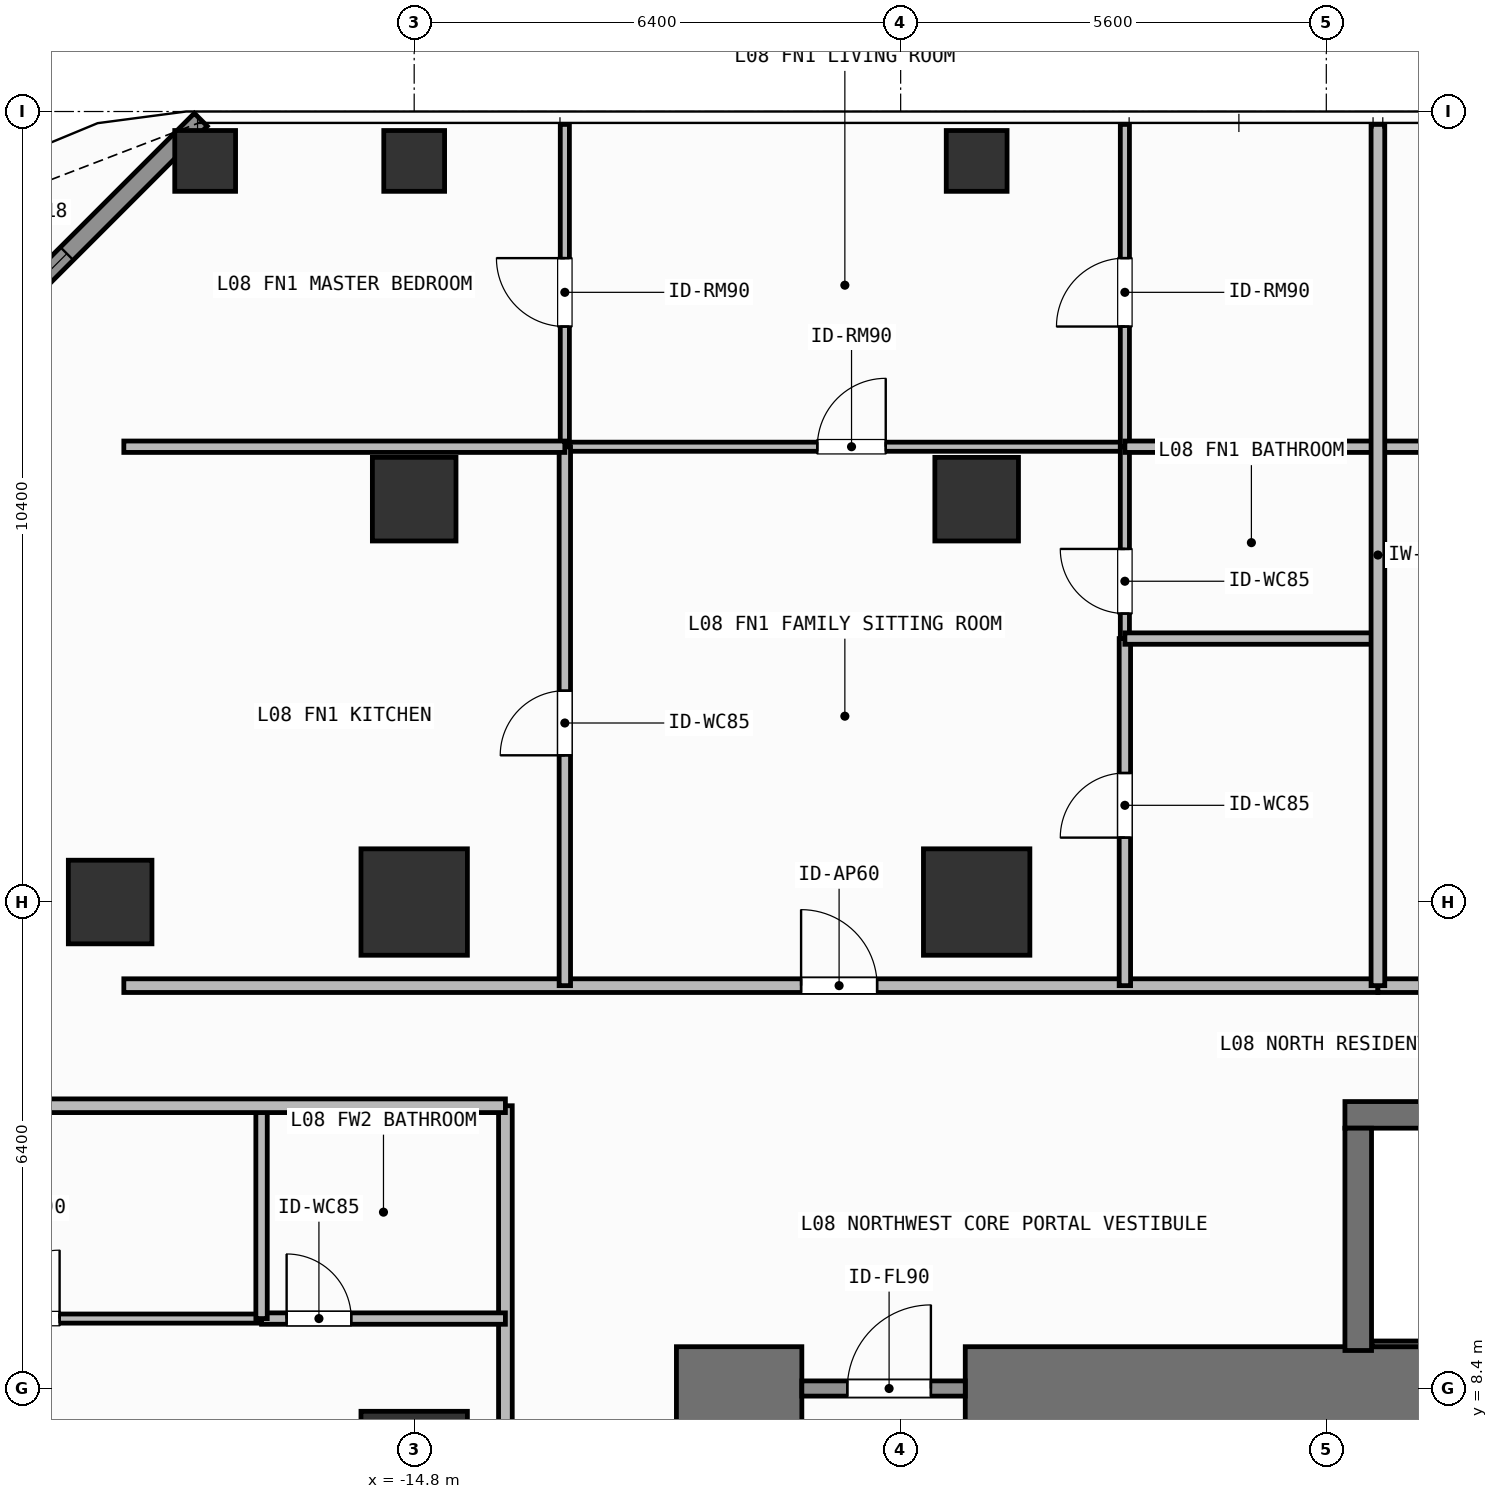
"""IFC4 building model, lengths in metres.
Left out: names, types, materials, properties, quantities, classifications, styles, units other than length and angle.
Written with IfcOpenShell. Run it as: python <this file> out.ifc"""

import sys

from ifc_helpers import new_model, si_unit, direction, frame, frame_2d, origin, origin_2d, place, context, subcontext, project, spatial, rectangle, hollow_rectangle, extrude, element, fill, save


model = new_model("IFC4")
c1 = context("Model", 3, precision=1e-05, world=origin(), true_north=direction((0.0, 1.0)))
c2 = subcontext(c1, "Body", "Model", "MODEL_VIEW")
j1 = project(units=[si_unit("LENGTHUNIT", "METRE"), si_unit("PLANEANGLEUNIT", "RADIAN")], contexts=[c1])
p1 = place(None, origin())
s1 = spatial("IfcSite", under=j1, at=p1, CompositionType="ELEMENT")
p2 = place(p1, origin())
s2 = spatial("IfcBuilding", under=s1, at=p2, CompositionType="ELEMENT")
p3 = place(p2, frame((0.0, 0.0, 30.6)))
s3 = spatial("IfcBuildingStorey", under=s2, at=p3, CompositionType="ELEMENT", Elevation=30.6)
p4 = place(p3, frame((-11.35, 8.4, 0.0), z_axis=(0.0, 0.0, 1.0), x_axis=(1.0, 0.0, 0.0)))
e1 = element("IfcWall", 1, at=p4, inside=s3, PredefinedType="SHEAR", context=c2, shape_type="SweptSolid", body=[
    extrude(rectangle(XDim=1.65, YDim=1.1, at=frame_2d((0.825, 0.0))), origin(), (0.0, 0.0, 1.0), 3.9),
])
p5 = place(p3, frame((-7.55, 8.4, 0.0), z_axis=(0.0, 0.0, 1.0), x_axis=(1.0, 0.0, 0.0)))
e2 = element("IfcWall", 2, at=p5, inside=s3, PredefinedType="SHEAR", context=c2, shape_type="SweptSolid", body=[
    extrude(rectangle(XDim=16.5, YDim=1.1, at=frame_2d((8.25, 0.0))), origin(), (0.0, 0.0, 1.0), 3.9),
])
p6 = place(p3, frame((-2.555, 12.0, 0.0), z_axis=(0.0, 0.0, 1.0), x_axis=(1.0, 0.0, 0.0)))
e3 = element("IfcWall", 3, at=p6, inside=s3, PredefinedType="SHEAR", context=c2, shape_type="SweptSolid", body=[
    extrude(rectangle(XDim=7.31, YDim=0.35, at=frame_2d((3.655, 0.0))), origin(), (0.0, 0.0, 1.0), 3.9),
])
p7 = place(p3, frame((-2.2, 8.988, 0.0), z_axis=(0.0, 0.0, 1.0), x_axis=(1.0, 0.0, 0.0)))
e4 = element("IfcWall", 4, at=p7, inside=s3, PredefinedType="SHEAR", context=c2, shape_type="SweptSolid", body=[
    extrude(rectangle(XDim=6.6, YDim=0.075, at=frame_2d((3.3, 0.0))), origin(), (0.0, 0.0, 1.0), 3.9),
])
p8 = place(p3, frame((-2.38, 8.9, 0.0), z_axis=(0.0, 0.0, 1.0), x_axis=(0.0, 1.0, 0.0)))
e5 = element("IfcWall", 5, at=p8, inside=s3, PredefinedType="SHEAR", context=c2, shape_type="SweptSolid", body=[
    extrude(rectangle(XDim=2.925, YDim=0.35, at=frame_2d((1.462, 0.0))), origin(), (0.0, 0.0, 1.0), 3.9),
])
for number, where, z_axis, x_axis in (
    (6, (-14.8, 14.8, 0.0), (0.0, 0.0, 1.0), (1.0, 0.0, 0.0)),
    (7, (-7.4, 14.8, 0.0), (0.0, 0.0, 1.0), (1.0, 0.0, 0.0)),
    (8, (-14.8, 7.4, 0.0), (0.0, 0.0, 1.0), (1.0, 0.0, 0.0)),
):
    element("IfcColumn", number, at=place(p3, frame(where, z_axis=z_axis, x_axis=x_axis)), inside=s3, PredefinedType="COLUMN", context=c2, shape_type="SweptSolid", body=[
        extrude(rectangle(XDim=1.4, YDim=1.4, at=origin_2d()), origin(), (0.0, 0.0, 1.0), 3.9),
    ])
for number, where, z_axis, x_axis in (
    (9, (-18.8, 14.8, 0.0), (0.0, 0.0, 1.0), (1.0, 0.0, 0.0)),
    (10, (-14.8, 20.1, 0.0), (0.0, 0.0, 1.0), (1.0, 0.0, 0.0)),
    (11, (-7.4, 20.1, 0.0), (0.0, 0.0, 1.0), (1.0, 0.0, 0.0)),
):
    element("IfcColumn", number, at=place(p3, frame(where, z_axis=z_axis, x_axis=x_axis)), inside=s3, PredefinedType="COLUMN", context=c2, shape_type="SweptSolid", body=[
        extrude(rectangle(XDim=1.1, YDim=1.1, at=origin_2d()), origin(), (0.0, 0.0, 1.0), 3.9),
    ])
for number, where, z_axis, x_axis in (
    (12, (-17.55, 24.55, 0.0), (0.0, 0.0, 1.0), (1.0, 0.0, 0.0)),
    (13, (-14.8, 24.55, 0.0), (0.0, 0.0, 1.0), (1.0, 0.0, 0.0)),
    (14, (-7.4, 24.55, 0.0), (0.0, 0.0, 1.0), (1.0, 0.0, 0.0)),
):
    element("IfcColumn", number, at=place(p3, frame(where, z_axis=z_axis, x_axis=x_axis)), inside=s3, PredefinedType="COLUMN", context=c2, shape_type="SweptSolid", body=[
        extrude(hollow_rectangle(XDim=0.8, YDim=0.8, WallThickness=0.036, at=origin_2d()), origin(), (0.0, 0.0, 1.0), 3.9),
    ])
p9 = place(p3, frame((-22.192, 20.508, 0.0), z_axis=(0.0, 0.0, 1.0), x_axis=(0.707106781187, 0.707106781187, 0.0)))
e15 = element("IfcWall", 15, at=p9, inside=s3, PredefinedType="SOLIDWALL", context=c2, shape_type="SweptSolid", body=[
    extrude(rectangle(XDim=6.484, YDim=0.24, at=frame_2d((3.242, 0.0))), origin(), (0.0, 0.0, 1.0), 3.68),
])
p10 = place(p9, frame((2.492, 0.0, 0.8)))
e16 = element("IfcOpeningElement", 16, at=p10, cuts=e15, PredefinedType="OPENING", context=c2, shape_type="SweptSolid", body=[
    extrude(rectangle(XDim=1.5, YDim=1.85, at=frame_2d((0.75, 0.925))), frame((0.0, 0.13, 0.0), z_axis=(0.0, -1.0, 0.0), x_axis=(1.0, 0.0, 0.0)), (0.0, 0.0, 1.0), 0.26),
])
p11 = place(p3, frame((-9.7, 8.4, 0.0), z_axis=(0.0, 0.0, 1.0), x_axis=(1.0, 0.0, 0.0)))
e17 = element("IfcWall", 17, at=p11, inside=s3, PredefinedType="SOLIDWALL", context=c2, shape_type="SweptSolid", body=[
    extrude(rectangle(XDim=2.15, YDim=0.2, at=frame_2d((1.075, 0.0))), origin(), (0.0, 0.0, 1.0), 2.72),
])
p12 = place(p11, frame((0.598, 0.0, 0.0)))
e18 = element("IfcOpeningElement", 18, at=p12, cuts=e17, PredefinedType="OPENING", context=c2, shape_type="SweptSolid", body=[
    extrude(rectangle(XDim=1.1, YDim=2.15, at=frame_2d((0.55, 1.075))), frame((0.0, 0.11, 0.0), z_axis=(0.0, -1.0, 0.0), x_axis=(1.0, 0.0, 0.0)), (0.0, 0.0, 1.0), 0.22),
])
p13 = place(p3, frame((-18.62, 13.7, 0.0), z_axis=(0.0, 0.0, 1.0), x_axis=(1.0, 0.0, 0.0)))
e19 = element("IfcWall", 19, at=p13, inside=s3, PredefinedType="PARTITIONING", context=c2, shape_type="SweptSolid", body=[
    extrude(rectangle(XDim=16.499, YDim=0.18, at=frame_2d((8.25, 0.0))), origin(), (0.0, 0.0, 1.0), 3.68),
])
p14 = place(p13, frame((8.91, 0.0, 0.0)))
e20 = element("IfcOpeningElement", 20, at=p14, cuts=e19, PredefinedType="OPENING", context=c2, shape_type="SweptSolid", body=[
    extrude(rectangle(XDim=1.0, YDim=2.2, at=frame_2d((0.5, 1.1))), frame((0.0, 0.1, 0.0), z_axis=(0.0, -1.0, 0.0), x_axis=(1.0, 0.0, 0.0)), (0.0, 0.0, 1.0), 0.2),
])
p15 = place(p3, frame((-12.818, 20.79, 0.0), z_axis=(0.0, 0.0, 1.0), x_axis=(1.0, 0.0, 0.0)))
e21 = element("IfcWall", 21, at=p15, inside=s3, PredefinedType="PARTITIONING", context=c2, shape_type="SweptSolid", body=[
    extrude(rectangle(XDim=7.368, YDim=0.12, at=frame_2d((3.684, 0.0))), origin(), (0.0, 0.0, 1.0), 3.68),
])
p16 = place(p15, frame((3.322, 0.0, 0.0)))
e22 = element("IfcOpeningElement", 22, at=p16, cuts=e21, PredefinedType="OPENING", context=c2, shape_type="SweptSolid", body=[
    extrude(rectangle(XDim=0.9, YDim=2.1, at=frame_2d((0.45, 1.05))), frame((0.0, 0.07, 0.0), z_axis=(0.0, -1.0, 0.0), x_axis=(1.0, 0.0, 0.0)), (0.0, 0.0, 1.0), 0.14),
])
p17 = place(p3, frame((-12.818, 13.7, 0.0), z_axis=(0.0, 0.0, 1.0), x_axis=(0.0, 1.0, 0.0)))
e23 = element("IfcWall", 23, at=p17, inside=s3, PredefinedType="PARTITIONING", context=c2, shape_type="SweptSolid", body=[
    extrude(rectangle(XDim=7.09, YDim=0.15, at=frame_2d((3.545, 0.0))), origin(), (0.0, 0.0, 1.0), 3.68),
])
p18 = place(p17, frame((3.03, 0.0, 0.0)))
e24 = element("IfcOpeningElement", 24, at=p18, cuts=e23, PredefinedType="OPENING", context=c2, shape_type="SweptSolid", body=[
    extrude(rectangle(XDim=0.85, YDim=2.1, at=frame_2d((0.425, 1.05))), frame((0.0, 0.085, 0.0), z_axis=(0.0, -1.0, 0.0), x_axis=(1.0, 0.0, 0.0)), (0.0, 0.0, 1.0), 0.17),
])
p19 = place(p3, frame((-12.818, 20.79, 0.0), z_axis=(0.0, 0.0, 1.0), x_axis=(0.0, 1.0, 0.0)))
e25 = element("IfcWall", 25, at=p19, inside=s3, PredefinedType="PARTITIONING", context=c2, shape_type="SweptSolid", body=[
    extrude(rectangle(XDim=4.24, YDim=0.12, at=frame_2d((2.12, 0.0))), origin(), (0.0, 0.0, 1.0), 3.68),
])
p20 = place(p19, frame((1.581, 0.0, 0.0)))
e26 = element("IfcOpeningElement", 26, at=p20, cuts=e25, PredefinedType="OPENING", context=c2, shape_type="SweptSolid", body=[
    extrude(rectangle(XDim=0.9, YDim=2.1, at=frame_2d((0.45, 1.05))), frame((0.0, 0.07, 0.0), z_axis=(0.0, -1.0, 0.0), x_axis=(1.0, 0.0, 0.0)), (0.0, 0.0, 1.0), 0.14),
])
p21 = place(p3, frame((-5.45, 13.7, 0.0), z_axis=(0.0, 0.0, 1.0), x_axis=(0.0, 1.0, 0.0)))
e27 = element("IfcWall", 27, at=p21, inside=s3, PredefinedType="PARTITIONING", context=c2, shape_type="SweptSolid", body=[
    extrude(rectangle(XDim=4.566, YDim=0.15, at=frame_2d((2.283, 0.0))), origin(), (0.0, 0.0, 1.0), 3.68),
])
p22 = place(p21, frame((1.948, 0.0, 0.0)))
e28 = element("IfcOpeningElement", 28, at=p22, cuts=e27, PredefinedType="OPENING", context=c2, shape_type="SweptSolid", body=[
    extrude(rectangle(XDim=0.85, YDim=2.1, at=frame_2d((0.425, 1.05))), frame((0.0, 0.085, 0.0), z_axis=(0.0, -1.0, 0.0), x_axis=(1.0, 0.0, 0.0)), (0.0, 0.0, 1.0), 0.17),
])
p23 = place(p3, frame((-5.45, 18.266, 0.0), z_axis=(0.0, 0.0, 1.0), x_axis=(0.0, 1.0, 0.0)))
e29 = element("IfcWall", 29, at=p23, inside=s3, PredefinedType="PARTITIONING", context=c2, shape_type="SweptSolid", body=[
    extrude(rectangle(XDim=2.524, YDim=0.12, at=frame_2d((1.262, 0.0))), origin(), (0.0, 0.0, 1.0), 3.68),
])
p24 = place(p23, frame((0.329, 0.0, 0.0)))
e30 = element("IfcOpeningElement", 30, at=p24, cuts=e29, PredefinedType="OPENING", context=c2, shape_type="SweptSolid", body=[
    extrude(rectangle(XDim=0.85, YDim=2.1, at=frame_2d((0.425, 1.05))), frame((0.0, 0.07, 0.0), z_axis=(0.0, -1.0, 0.0), x_axis=(1.0, 0.0, 0.0)), (0.0, 0.0, 1.0), 0.14),
])
p25 = place(p3, frame((-5.45, 20.79, 0.0), z_axis=(0.0, 0.0, 1.0), x_axis=(0.0, 1.0, 0.0)))
e31 = element("IfcWall", 31, at=p25, inside=s3, PredefinedType="PARTITIONING", context=c2, shape_type="SweptSolid", body=[
    extrude(rectangle(XDim=4.24, YDim=0.12, at=frame_2d((2.12, 0.0))), origin(), (0.0, 0.0, 1.0), 3.68),
])
p26 = place(p25, frame((1.581, 0.0, 0.0)))
e32 = element("IfcOpeningElement", 32, at=p26, cuts=e31, PredefinedType="OPENING", context=c2, shape_type="SweptSolid", body=[
    extrude(rectangle(XDim=0.9, YDim=2.1, at=frame_2d((0.45, 1.05))), frame((0.0, 0.07, 0.0), z_axis=(0.0, -1.0, 0.0), x_axis=(1.0, 0.0, 0.0)), (0.0, 0.0, 1.0), 0.14),
])
p27 = place(p3, frame((-2.121, 13.7, 0.0), z_axis=(0.0, 0.0, 1.0), x_axis=(1.0, 0.0, 0.0)))
e33 = element("IfcWall", 33, at=p27, inside=s3, PredefinedType="PARTITIONING", context=c2, shape_type="SweptSolid", body=[
    extrude(rectangle(XDim=11.226, YDim=0.18, at=frame_2d((5.613, 0.0))), origin(), (0.0, 0.0, 1.0), 3.68),
])
p28 = place(p27, frame((5.29, 0.0, 0.0)))
e34 = element("IfcOpeningElement", 34, at=p28, cuts=e33, PredefinedType="OPENING", context=c2, shape_type="SweptSolid", body=[
    extrude(rectangle(XDim=1.0, YDim=2.2, at=frame_2d((0.5, 1.1))), frame((0.0, 0.1, 0.0), z_axis=(0.0, -1.0, 0.0), x_axis=(1.0, 0.0, 0.0)), (0.0, 0.0, 1.0), 0.2),
])
p29 = place(p3, frame((-13.6, 0.727, 0.0), z_axis=(0.0, 0.0, 1.0), x_axis=(0.0, 1.0, 0.0)))
e35 = element("IfcWall", 35, at=p29, inside=s3, PredefinedType="PARTITIONING", context=c2, shape_type="SweptSolid", body=[
    extrude(rectangle(XDim=11.393, YDim=0.18, at=frame_2d((5.697, 0.0))), origin(), (0.0, 0.0, 1.0), 3.68),
])
p30 = place(p29, frame((4.837, 0.0, 0.0)))
e36 = element("IfcOpeningElement", 36, at=p30, cuts=e35, PredefinedType="OPENING", context=c2, shape_type="SweptSolid", body=[
    extrude(rectangle(XDim=1.0, YDim=2.2, at=frame_2d((0.5, 1.1))), frame((0.0, 0.1, 0.0), z_axis=(0.0, -1.0, 0.0), x_axis=(1.0, 0.0, 0.0)), (0.0, 0.0, 1.0), 0.2),
])
p31 = place(p3, frame((-16.808, 9.32, 0.0), z_axis=(0.0, 0.0, 1.0), x_axis=(1.0, 0.0, 0.0)))
e37 = element("IfcWall", 37, at=p31, inside=s3, PredefinedType="PARTITIONING", context=c2, shape_type="SweptSolid", body=[
    extrude(rectangle(XDim=3.208, YDim=0.15, at=frame_2d((1.604, 0.0))), origin(), (0.0, 0.0, 1.0), 3.68),
])
p32 = place(p31, frame((0.33, 0.0, 0.0)))
e38 = element("IfcOpeningElement", 38, at=p32, cuts=e37, PredefinedType="OPENING", context=c2, shape_type="SweptSolid", body=[
    extrude(rectangle(XDim=0.85, YDim=2.1, at=frame_2d((0.425, 1.05))), frame((0.0, 0.085, 0.0), z_axis=(0.0, -1.0, 0.0), x_axis=(1.0, 0.0, 0.0)), (0.0, 0.0, 1.0), 0.17),
])
p33 = place(p3, frame((-22.13, 9.32, 0.0), z_axis=(0.0, 0.0, 1.0), x_axis=(1.0, 0.0, 0.0)))
e39 = element("IfcWall", 39, at=p33, inside=s3, PredefinedType="PARTITIONING", context=c2, shape_type="SweptSolid", body=[
    extrude(rectangle(XDim=5.322, YDim=0.12, at=frame_2d((2.661, 0.0))), origin(), (0.0, 0.0, 1.0), 3.68),
])
p34 = place(p33, frame((1.765, 0.0, 0.0)))
e40 = element("IfcOpeningElement", 40, at=p34, cuts=e39, PredefinedType="OPENING", context=c2, shape_type="SweptSolid", body=[
    extrude(rectangle(XDim=0.9, YDim=2.1, at=frame_2d((0.45, 1.05))), frame((0.0, 0.07, 0.0), z_axis=(0.0, -1.0, 0.0), x_axis=(1.0, 0.0, 0.0)), (0.0, 0.0, 1.0), 0.14),
])
p35 = place(p3, frame((-18.62, 20.79, 0.0), z_axis=(0.0, 0.0, 1.0), x_axis=(1.0, 0.0, 0.0)))
e41 = element("IfcWall", 41, at=p35, inside=s3, PredefinedType="PARTITIONING", context=c2, shape_type="SweptSolid", body=[
    extrude(rectangle(XDim=5.802, YDim=0.15, at=frame_2d((2.901, 0.0))), origin(), (0.0, 0.0, 1.0), 3.68),
])
for number, where, z_axis, x_axis in (
    (42, (-5.45, 18.266, 0.0), (0.0, 0.0, 1.0), (1.0, 0.0, 0.0)),
    (43, (-5.45, 20.79, 0.0), (0.0, 0.0, 1.0), (1.0, 0.0, 0.0)),
):
    element("IfcWall", number, at=place(p3, frame(where, z_axis=z_axis, x_axis=x_axis)), inside=s3, PredefinedType="PARTITIONING", context=c2, shape_type="SweptSolid", body=[
        extrude(rectangle(XDim=3.329, YDim=0.15, at=frame_2d((1.665, 0.0))), origin(), (0.0, 0.0, 1.0), 3.68),
    ])
p36 = place(p3, frame((-2.121, 20.79, 0.0), z_axis=(0.0, 0.0, 1.0), x_axis=(1.0, 0.0, 0.0)))
e44 = element("IfcWall", 44, at=p36, inside=s3, PredefinedType="PARTITIONING", context=c2, shape_type="SweptSolid", body=[
    extrude(rectangle(XDim=4.1, YDim=0.15, at=frame_2d((2.05, 0.0))), origin(), (0.0, 0.0, 1.0), 3.68),
])
p37 = place(p3, frame((-2.121, 13.7, 0.0), z_axis=(0.0, 0.0, 1.0), x_axis=(0.0, 1.0, 0.0)))
e45 = element("IfcWall", 45, at=p37, inside=s3, PredefinedType="PARTITIONING", context=c2, shape_type="SweptSolid", body=[
    extrude(rectangle(XDim=11.33, YDim=0.18, at=frame_2d((5.665, 0.0))), origin(), (0.0, 0.0, 1.0), 3.68),
])
p38 = place(p3, frame((-16.808, 9.32, 0.0), z_axis=(0.0, 0.0, 1.0), x_axis=(0.0, 1.0, 0.0)))
e46 = element("IfcWall", 46, at=p38, inside=s3, PredefinedType="PARTITIONING", context=c2, shape_type="SweptSolid", body=[
    extrude(rectangle(XDim=2.8, YDim=0.15, at=frame_2d((1.4, 0.0))), origin(), (0.0, 0.0, 1.0), 3.68),
])
p39 = place(p3, frame((-22.13, 12.12, 0.0), z_axis=(0.0, 0.0, 1.0), x_axis=(1.0, 0.0, 0.0)))
e47 = element("IfcWall", 47, at=p39, inside=s3, PredefinedType="PARTITIONING", context=c2, shape_type="SweptSolid", body=[
    extrude(rectangle(XDim=8.53, YDim=0.18, at=frame_2d((4.265, 0.0))), origin(), (0.0, 0.0, 1.0), 3.68),
])
p40 = place(p10, origin())
e48 = element("IfcWindow", 48, at=p40, inside=s3, PartitioningType="SINGLE_PANEL", PredefinedType="WINDOW", context=c2, shape_type="SweptSolid", body=[
    extrude(rectangle(XDim=1.5, YDim=1.85, at=frame_2d((0.75, 0.925))), frame((0.0, 0.03, 0.0), z_axis=(0.0, -1.0, 0.0), x_axis=(1.0, 0.0, 0.0)), (0.0, 0.0, 1.0), 0.06),
])
fill(e16, e48)
p41 = place(p12, origin())
e49 = element("IfcDoor", 49, at=p41, inside=s3, OperationType="SINGLE_SWING_RIGHT", PredefinedType="DOOR", context=c2, shape_type="SweptSolid", body=[
    extrude(rectangle(XDim=1.1, YDim=2.15, at=frame_2d((0.55, 1.075))), frame((0.0, 0.025, 0.0), z_axis=(0.0, -1.0, 0.0), x_axis=(1.0, 0.0, 0.0)), (0.0, 0.0, 1.0), 0.05),
])
fill(e18, e49)
p42 = place(p14, origin())
e50 = element("IfcDoor", 50, at=p42, inside=s3, OperationType="SINGLE_SWING_LEFT", PredefinedType="DOOR", context=c2, shape_type="SweptSolid", body=[
    extrude(rectangle(XDim=1.0, YDim=2.2, at=frame_2d((0.5, 1.1))), frame((0.0, 0.025, 0.0), z_axis=(0.0, -1.0, 0.0), x_axis=(1.0, 0.0, 0.0)), (0.0, 0.0, 1.0), 0.05),
])
fill(e20, e50)
p43 = place(p16, origin())
e51 = element("IfcDoor", 51, at=p43, inside=s3, OperationType="SINGLE_SWING_RIGHT", PredefinedType="DOOR", context=c2, shape_type="SweptSolid", body=[
    extrude(rectangle(XDim=0.9, YDim=2.1, at=frame_2d((0.45, 1.05))), frame((0.0, 0.025, 0.0), z_axis=(0.0, -1.0, 0.0), x_axis=(1.0, 0.0, 0.0)), (0.0, 0.0, 1.0), 0.05),
])
fill(e22, e51)
p44 = place(p18, origin())
e52 = element("IfcDoor", 52, at=p44, inside=s3, OperationType="SINGLE_SWING_LEFT", PredefinedType="DOOR", context=c2, shape_type="SweptSolid", body=[
    extrude(rectangle(XDim=0.85, YDim=2.1, at=frame_2d((0.425, 1.05))), frame((0.0, 0.025, 0.0), z_axis=(0.0, -1.0, 0.0), x_axis=(1.0, 0.0, 0.0)), (0.0, 0.0, 1.0), 0.05),
])
fill(e24, e52)
p45 = place(p20, origin())
e53 = element("IfcDoor", 53, at=p45, inside=s3, OperationType="SINGLE_SWING_RIGHT", PredefinedType="DOOR", context=c2, shape_type="SweptSolid", body=[
    extrude(rectangle(XDim=0.9, YDim=2.1, at=frame_2d((0.45, 1.05))), frame((0.0, 0.025, 0.0), z_axis=(0.0, -1.0, 0.0), x_axis=(1.0, 0.0, 0.0)), (0.0, 0.0, 1.0), 0.05),
])
fill(e26, e53)
p46 = place(p22, origin())
e54 = element("IfcDoor", 54, at=p46, inside=s3, OperationType="SINGLE_SWING_LEFT", PredefinedType="DOOR", context=c2, shape_type="SweptSolid", body=[
    extrude(rectangle(XDim=0.85, YDim=2.1, at=frame_2d((0.425, 1.05))), frame((0.0, 0.025, 0.0), z_axis=(0.0, -1.0, 0.0), x_axis=(1.0, 0.0, 0.0)), (0.0, 0.0, 1.0), 0.05),
])
fill(e28, e54)
p47 = place(p24, origin())
e55 = element("IfcDoor", 55, at=p47, inside=s3, OperationType="SINGLE_SWING_RIGHT", PredefinedType="DOOR", context=c2, shape_type="SweptSolid", body=[
    extrude(rectangle(XDim=0.85, YDim=2.1, at=frame_2d((0.425, 1.05))), frame((0.0, 0.025, 0.0), z_axis=(0.0, -1.0, 0.0), x_axis=(1.0, 0.0, 0.0)), (0.0, 0.0, 1.0), 0.05),
])
fill(e30, e55)
p48 = place(p26, origin())
e56 = element("IfcDoor", 56, at=p48, inside=s3, OperationType="SINGLE_SWING_LEFT", PredefinedType="DOOR", context=c2, shape_type="SweptSolid", body=[
    extrude(rectangle(XDim=0.9, YDim=2.1, at=frame_2d((0.45, 1.05))), frame((0.0, 0.025, 0.0), z_axis=(0.0, -1.0, 0.0), x_axis=(1.0, 0.0, 0.0)), (0.0, 0.0, 1.0), 0.05),
])
fill(e32, e56)
p49 = place(p32, origin())
e57 = element("IfcDoor", 57, at=p49, inside=s3, OperationType="SINGLE_SWING_LEFT", PredefinedType="DOOR", context=c2, shape_type="SweptSolid", body=[
    extrude(rectangle(XDim=0.85, YDim=2.1, at=frame_2d((0.425, 1.05))), frame((0.0, 0.025, 0.0), z_axis=(0.0, -1.0, 0.0), x_axis=(1.0, 0.0, 0.0)), (0.0, 0.0, 1.0), 0.05),
])
fill(e38, e57)
p50 = place(p34, origin())
e58 = element("IfcDoor", 58, at=p50, inside=s3, OperationType="SINGLE_SWING_RIGHT", PredefinedType="DOOR", context=c2, shape_type="SweptSolid", body=[
    extrude(rectangle(XDim=0.9, YDim=2.1, at=frame_2d((0.45, 1.05))), frame((0.0, 0.025, 0.0), z_axis=(0.0, -1.0, 0.0), x_axis=(1.0, 0.0, 0.0)), (0.0, 0.0, 1.0), 0.05),
])
fill(e40, e58)
save(model, sys.argv[1])
